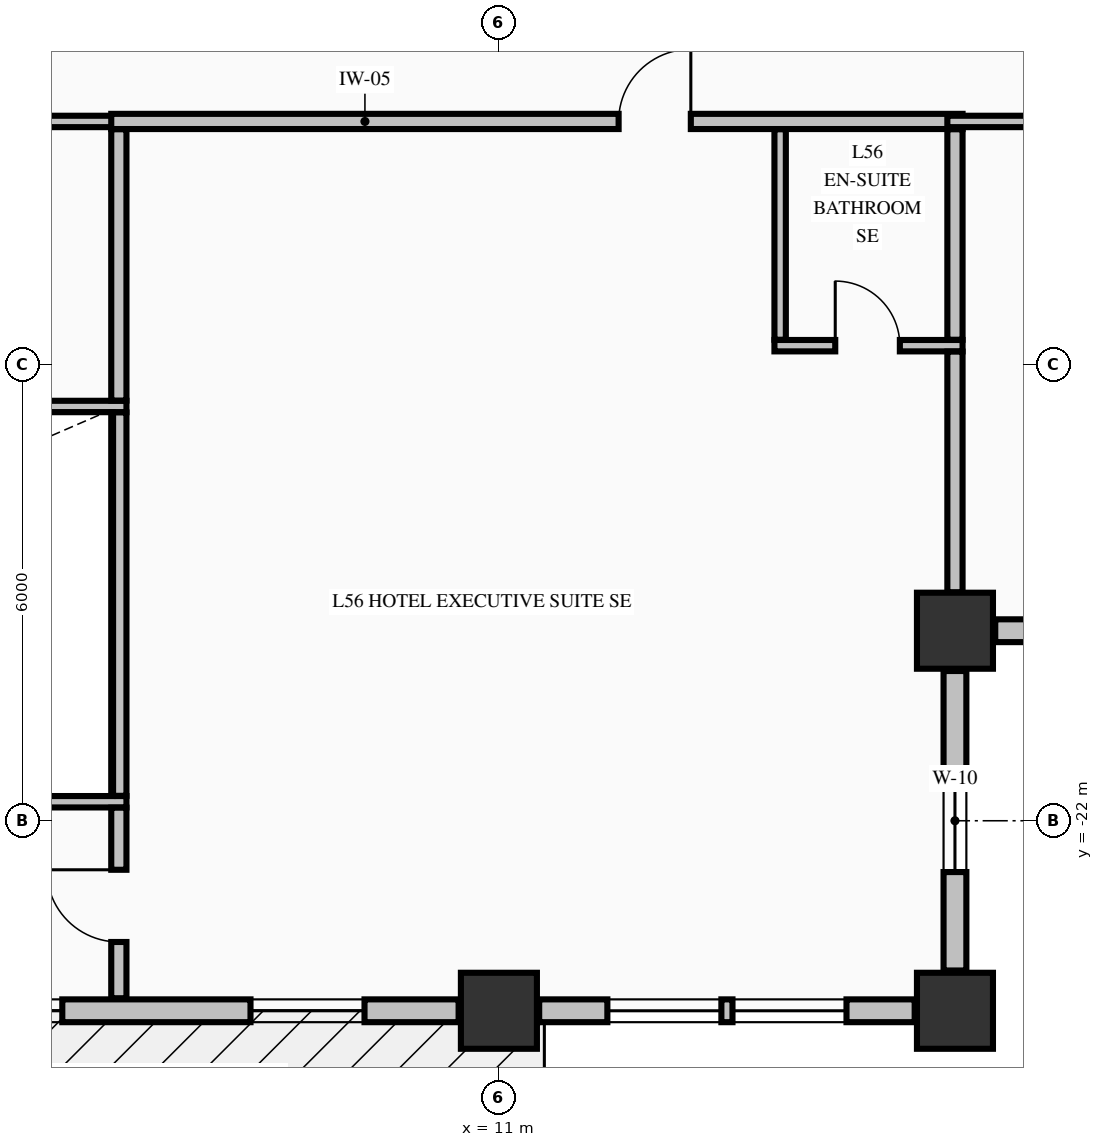
"""IFC4 building model, lengths in metres.
Left out: names, types, materials, properties, quantities, classifications, styles, units other than length and angle.
Written with IfcOpenShell. Run it as: python <this file> out.ifc"""

import sys

from ifc_helpers import new_model, si_unit, direction, frame, frame_2d, origin, origin_2d, place, context, subcontext, project, spatial, rectangle, extrude, element, fill, save


model = new_model("IFC4")
c1 = context("Model", 3, precision=1e-05, world=origin(), true_north=direction((0.0, 1.0)))
c2 = subcontext(c1, "Body", "Model", "MODEL_VIEW")
j1 = project(units=[si_unit("LENGTHUNIT", "METRE"), si_unit("PLANEANGLEUNIT", "RADIAN")], contexts=[c1])
p1 = place(None, origin())
s1 = spatial("IfcSite", under=j1, at=p1, CompositionType="ELEMENT")
p2 = place(p1, origin())
s2 = spatial("IfcBuilding", under=s1, at=p2, CompositionType="ELEMENT")
p3 = place(p2, frame((0.0, 0.0, 215.26)))
s3 = spatial("IfcBuildingStorey", under=s2, at=p3, CompositionType="ELEMENT", Elevation=215.26)
for number, where, z_axis, x_axis in (
    (1, (11.0, -24.5, -0.25), (0.0, 0.0, 1.0), (1.0, 0.0, 0.0)),
    (2, (17.0, -24.5, -0.25), (0.0, 0.0, 1.0), (1.0, 0.0, 0.0)),
    (3, (17.0, -19.5, -0.25), (0.0, 0.0, 1.0), (1.0, 0.0, 0.0)),
):
    element("IfcColumn", number, at=place(p3, frame(where, z_axis=z_axis, x_axis=x_axis)), inside=s3, PredefinedType="COLUMN", context=c2, shape_type="SweptSolid", body=[
        extrude(rectangle(XDim=1.0, YDim=1.0, at=origin_2d()), origin(), (0.0, 0.0, 1.0), 3.4),
    ])
p4 = place(p3, frame((17.0, -23.97, 0.0), z_axis=(0.0, 0.0, 1.0), x_axis=(0.0, 1.0, 0.0)))
e4 = element("IfcWall", 4, at=p4, inside=s3, PredefinedType="STANDARD", context=c2, shape_type="SweptSolid", body=[
    extrude(rectangle(XDim=3.94, YDim=0.3, at=frame_2d((1.97, 0.0))), origin(), (0.0, 0.0, 1.0), 2.542),
])
p5 = place(p4, frame((1.295, 0.0, 0.68)))
e5 = element("IfcOpeningElement", 5, at=p5, cuts=e4, PredefinedType="OPENING", context=c2, shape_type="SweptSolid", body=[
    extrude(rectangle(XDim=1.35, YDim=1.42, at=frame_2d((0.675, 0.71))), frame((0.0, 0.16, 0.0), z_axis=(0.0, -1.0, 0.0), x_axis=(1.0, 0.0, 0.0)), (0.0, 0.0, 1.0), 0.32),
])
p6 = place(p3, frame((17.53, -19.5, 0.0), z_axis=(0.0, 0.0, 1.0), x_axis=(1.0, 0.0, 0.0)))
e6 = element("IfcWall", 6, at=p6, inside=s3, PredefinedType="STANDARD", context=c2, shape_type="SweptSolid", body=[
    extrude(rectangle(XDim=3.94, YDim=0.3, at=frame_2d((1.97, 0.0))), origin(), (0.0, 0.0, 1.0), 2.542),
])
p7 = place(p6, frame((1.295, 0.0, 0.68)))
e7 = element("IfcOpeningElement", 7, at=p7, cuts=e6, PredefinedType="OPENING", context=c2, shape_type="SweptSolid", body=[
    extrude(rectangle(XDim=1.35, YDim=1.42, at=frame_2d((0.675, 0.71))), frame((0.0, 0.16, 0.0), z_axis=(0.0, -1.0, 0.0), x_axis=(1.0, 0.0, 0.0)), (0.0, 0.0, 1.0), 0.32),
])
p8 = place(p3, frame((0.53, -24.5, 0.0), z_axis=(0.0, 0.0, 1.0), x_axis=(1.0, 0.0, 0.0)))
e8 = element("IfcWall", 8, at=p8, inside=s3, PredefinedType="STANDARD", context=c2, shape_type="SweptSolid", body=[
    extrude(rectangle(XDim=9.94, YDim=0.3, at=frame_2d((4.97, 0.0))), origin(), (0.0, 0.0, 1.0), 2.542),
])
p9 = place(p8, frame((1.238, 0.0, 0.72)))
e9 = element("IfcOpeningElement", 9, at=p9, cuts=e8, PredefinedType="OPENING", context=c2, shape_type="SweptSolid", body=[
    extrude(rectangle(XDim=1.5, YDim=1.6, at=frame_2d((0.75, 0.8))), frame((0.0, 0.16, 0.0), z_axis=(0.0, -1.0, 0.0), x_axis=(1.0, 0.0, 0.0)), (0.0, 0.0, 1.0), 0.32),
])
p10 = place(p8, frame((3.226, 0.0, 0.72)))
e10 = element("IfcOpeningElement", 10, at=p10, cuts=e8, PredefinedType="OPENING", context=c2, shape_type="SweptSolid", body=[
    extrude(rectangle(XDim=1.5, YDim=1.6, at=frame_2d((0.75, 0.8))), frame((0.0, 0.16, 0.0), z_axis=(0.0, -1.0, 0.0), x_axis=(1.0, 0.0, 0.0)), (0.0, 0.0, 1.0), 0.32),
])
p11 = place(p8, frame((7.202, 0.0, 0.72)))
e11 = element("IfcOpeningElement", 11, at=p11, cuts=e8, PredefinedType="OPENING", context=c2, shape_type="SweptSolid", body=[
    extrude(rectangle(XDim=1.5, YDim=1.6, at=frame_2d((0.75, 0.8))), frame((0.0, 0.16, 0.0), z_axis=(0.0, -1.0, 0.0), x_axis=(1.0, 0.0, 0.0)), (0.0, 0.0, 1.0), 0.32),
])
p12 = place(p3, frame((11.53, -24.5, 0.0), z_axis=(0.0, 0.0, 1.0), x_axis=(1.0, 0.0, 0.0)))
e12 = element("IfcWall", 12, at=p12, inside=s3, PredefinedType="STANDARD", context=c2, shape_type="SweptSolid", body=[
    extrude(rectangle(XDim=4.94, YDim=0.3, at=frame_2d((2.47, 0.0))), origin(), (0.0, 0.0, 1.0), 2.542),
])
p13 = place(p12, frame((0.897, 0.0, 0.72)))
e13 = element("IfcOpeningElement", 13, at=p13, cuts=e12, PredefinedType="OPENING", context=c2, shape_type="SweptSolid", body=[
    extrude(rectangle(XDim=1.5, YDim=1.6, at=frame_2d((0.75, 0.8))), frame((0.0, 0.16, 0.0), z_axis=(0.0, -1.0, 0.0), x_axis=(1.0, 0.0, 0.0)), (0.0, 0.0, 1.0), 0.32),
])
p14 = place(p12, frame((2.543, 0.0, 0.72)))
e14 = element("IfcOpeningElement", 14, at=p14, cuts=e12, PredefinedType="OPENING", context=c2, shape_type="SweptSolid", body=[
    extrude(rectangle(XDim=1.5, YDim=1.6, at=frame_2d((0.75, 0.8))), frame((0.0, 0.16, 0.0), z_axis=(0.0, -1.0, 0.0), x_axis=(1.0, 0.0, 0.0)), (0.0, 0.0, 1.0), 0.32),
])
for number, where, z_axis, x_axis in (
    (15, (-6.1, -21.75, 0.0), (0.0, 0.0, 1.0), (1.0, 0.0, 0.0)),
    (16, (-6.1, -16.55, 0.0), (0.0, 0.0, 1.0), (1.0, 0.0, 0.0)),
):
    element("IfcWall", number, at=place(p3, frame(where, z_axis=z_axis, x_axis=x_axis)), inside=s3, PredefinedType="PARTITIONING", context=c2, shape_type="SweptSolid", body=[
        extrude(rectangle(XDim=12.2, YDim=0.15, at=frame_2d((6.1, 0.0))), origin(), (0.0, 0.0, 1.0), 3.15),
    ])
p15 = place(p3, frame((14.625, -15.75, 0.0), z_axis=(0.0, 0.0, 1.0), x_axis=(1.0, 0.0, 0.0)))
e17 = element("IfcWall", 17, at=p15, inside=s3, PredefinedType="PARTITIONING", context=c2, shape_type="SweptSolid", body=[
    extrude(rectangle(XDim=2.475, YDim=0.15, at=frame_2d((1.238, 0.0))), origin(), (0.0, 0.0, 1.0), 3.15),
])
p16 = place(p15, frame((0.8, 0.0, 0.0)))
e18 = element("IfcOpeningElement", 18, at=p16, cuts=e17, PredefinedType="OPENING", context=c2, shape_type="SweptSolid", body=[
    extrude(rectangle(XDim=0.85, YDim=2.1, at=frame_2d((0.425, 1.05))), frame((0.0, 0.085, 0.0), z_axis=(0.0, -1.0, 0.0), x_axis=(1.0, 0.0, 0.0)), (0.0, 0.0, 1.0), 0.17),
])
p17 = place(p3, frame((-6.1, -12.8, 0.0), z_axis=(0.0, 0.0, 1.0), x_axis=(1.0, 0.0, 0.0)))
e19 = element("IfcWall", 19, at=p17, inside=s3, PredefinedType="PARTITIONING", context=c2, shape_type="SweptSolid", body=[
    extrude(rectangle(XDim=12.2, YDim=0.15, at=frame_2d((6.1, 0.0))), origin(), (0.0, 0.0, 1.0), 3.15),
])
p18 = place(p17, frame((2.75, 0.0, 0.0)))
e20 = element("IfcOpeningElement", 20, at=p18, cuts=e19, PredefinedType="OPENING", context=c2, shape_type="SweptSolid", body=[
    extrude(rectangle(XDim=1.1, YDim=2.15, at=frame_2d((0.55, 1.075))), frame((0.0, 0.085, 0.0), z_axis=(0.0, -1.0, 0.0), x_axis=(1.0, 0.0, 0.0)), (0.0, 0.0, 1.0), 0.17),
])
p19 = place(p3, frame((5.9, -12.8, 0.0), z_axis=(0.0, 0.0, 1.0), x_axis=(1.0, 0.0, 0.0)))
e21 = element("IfcWall", 21, at=p19, inside=s3, PredefinedType="PARTITIONING", context=c2, shape_type="SweptSolid", body=[
    extrude(rectangle(XDim=11.2, YDim=0.2, at=frame_2d((5.6, 0.0))), origin(), (0.0, 0.0, 1.0), 3.15),
])
p20 = place(p19, frame((6.675, 0.0, 0.0)))
e22 = element("IfcOpeningElement", 22, at=p20, cuts=e21, PredefinedType="OPENING", context=c2, shape_type="SweptSolid", body=[
    extrude(rectangle(XDim=0.95, YDim=2.15, at=frame_2d((0.475, 1.075))), frame((0.0, 0.11, 0.0), z_axis=(0.0, -1.0, 0.0), x_axis=(1.0, 0.0, 0.0)), (0.0, 0.0, 1.0), 0.22),
])
p21 = place(p3, frame((16.9, -12.8, 0.0), z_axis=(0.0, 0.0, 1.0), x_axis=(1.0, 0.0, 0.0)))
e23 = element("IfcWall", 23, at=p21, inside=s3, PredefinedType="PARTITIONING", context=c2, shape_type="SweptSolid", body=[
    extrude(rectangle(XDim=3.175, YDim=0.15, at=frame_2d((1.587, 0.0))), origin(), (0.0, 0.0, 1.0), 3.15),
])
p22 = place(p3, frame((6.0, -24.335, 0.0), z_axis=(0.0, 0.0, 1.0), x_axis=(0.0, 1.0, 0.0)))
e24 = element("IfcWall", 24, at=p22, inside=s3, PredefinedType="PARTITIONING", context=c2, shape_type="SweptSolid", body=[
    extrude(rectangle(XDim=2.507, YDim=0.2, at=frame_2d((1.253, 0.0))), origin(), (0.0, 0.0, 1.0), 3.15),
])
p23 = place(p22, frame((0.74, 0.0, 0.0)))
e25 = element("IfcOpeningElement", 25, at=p23, cuts=e24, PredefinedType="OPENING", context=c2, shape_type="SweptSolid", body=[
    extrude(rectangle(XDim=0.95, YDim=2.15, at=frame_2d((0.475, 1.075))), frame((0.0, 0.11, 0.0), z_axis=(0.0, -1.0, 0.0), x_axis=(1.0, 0.0, 0.0)), (0.0, 0.0, 1.0), 0.22),
])
p24 = place(p3, frame((6.0, -21.672, 0.0), z_axis=(0.0, 0.0, 1.0), x_axis=(0.0, 1.0, 0.0)))
e26 = element("IfcWall", 26, at=p24, inside=s3, PredefinedType="PARTITIONING", context=c2, shape_type="SweptSolid", body=[
    extrude(rectangle(XDim=5.044, YDim=0.2, at=frame_2d((2.522, 0.0))), origin(), (0.0, 0.0, 1.0), 3.15),
])
p25 = place(p3, frame((6.0, -16.472, 0.0), z_axis=(0.0, 0.0, 1.0), x_axis=(0.0, 1.0, 0.0)))
e27 = element("IfcWall", 27, at=p25, inside=s3, PredefinedType="PARTITIONING", context=c2, shape_type="SweptSolid", body=[
    extrude(rectangle(XDim=3.569, YDim=0.2, at=frame_2d((1.784, 0.0))), origin(), (0.0, 0.0, 1.0), 3.15),
])
p26 = place(p3, frame((14.7, -15.672, 0.0), z_axis=(0.0, 0.0, 1.0), x_axis=(0.0, 1.0, 0.0)))
e28 = element("IfcWall", 28, at=p26, inside=s3, PredefinedType="PARTITIONING", context=c2, shape_type="SweptSolid", body=[
    extrude(rectangle(XDim=2.769, YDim=0.15, at=frame_2d((1.385, 0.0))), origin(), (0.0, 0.0, 1.0), 3.15),
])
p27 = place(p3, frame((17.0, -18.994, 0.0), z_axis=(0.0, 0.0, 1.0), x_axis=(0.0, 1.0, 0.0)))
e29 = element("IfcWall", 29, at=p27, inside=s3, PredefinedType="PARTITIONING", context=c2, shape_type="SweptSolid", body=[
    extrude(rectangle(XDim=3.166, YDim=0.2, at=frame_2d((1.583, 0.0))), origin(), (0.0, 0.0, 1.0), 3.15),
])
p28 = place(p3, frame((17.0, -15.672, 0.0), z_axis=(0.0, 0.0, 1.0), x_axis=(0.0, 1.0, 0.0)))
e30 = element("IfcWall", 30, at=p28, inside=s3, PredefinedType="PARTITIONING", context=c2, shape_type="SweptSolid", body=[
    extrude(rectangle(XDim=2.769, YDim=0.2, at=frame_2d((1.385, 0.0))), origin(), (0.0, 0.0, 1.0), 3.15),
])
p29 = place(p5, origin())
e31 = element("IfcWindow", 31, at=p29, inside=s3, PartitioningType="SINGLE_PANEL", PredefinedType="WINDOW", context=c2, shape_type="SweptSolid", body=[
    extrude(rectangle(XDim=1.35, YDim=1.42, at=frame_2d((0.675, 0.71))), frame((0.0, 0.03, 0.0), z_axis=(0.0, -1.0, 0.0), x_axis=(1.0, 0.0, 0.0)), (0.0, 0.0, 1.0), 0.06),
])
fill(e5, e31)
p30 = place(p10, origin())
e32 = element("IfcWindow", 32, at=p30, inside=s3, PartitioningType="SINGLE_PANEL", PredefinedType="WINDOW", context=c2, shape_type="SweptSolid", body=[
    extrude(rectangle(XDim=1.5, YDim=1.6, at=frame_2d((0.75, 0.8))), frame((0.0, 0.03, 0.0), z_axis=(0.0, -1.0, 0.0), x_axis=(1.0, 0.0, 0.0)), (0.0, 0.0, 1.0), 0.06),
])
fill(e10, e32)
p31 = place(p11, origin())
e33 = element("IfcWindow", 33, at=p31, inside=s3, PartitioningType="SINGLE_PANEL", PredefinedType="WINDOW", context=c2, shape_type="SweptSolid", body=[
    extrude(rectangle(XDim=1.5, YDim=1.6, at=frame_2d((0.75, 0.8))), frame((0.0, 0.03, 0.0), z_axis=(0.0, -1.0, 0.0), x_axis=(1.0, 0.0, 0.0)), (0.0, 0.0, 1.0), 0.06),
])
fill(e11, e33)
p32 = place(p13, origin())
e34 = element("IfcWindow", 34, at=p32, inside=s3, PartitioningType="SINGLE_PANEL", PredefinedType="WINDOW", context=c2, shape_type="SweptSolid", body=[
    extrude(rectangle(XDim=1.5, YDim=1.6, at=frame_2d((0.75, 0.8))), frame((0.0, 0.03, 0.0), z_axis=(0.0, -1.0, 0.0), x_axis=(1.0, 0.0, 0.0)), (0.0, 0.0, 1.0), 0.06),
])
fill(e13, e34)
p33 = place(p14, origin())
e35 = element("IfcWindow", 35, at=p33, inside=s3, PartitioningType="SINGLE_PANEL", PredefinedType="WINDOW", context=c2, shape_type="SweptSolid", body=[
    extrude(rectangle(XDim=1.5, YDim=1.6, at=frame_2d((0.75, 0.8))), frame((0.0, 0.03, 0.0), z_axis=(0.0, -1.0, 0.0), x_axis=(1.0, 0.0, 0.0)), (0.0, 0.0, 1.0), 0.06),
])
fill(e14, e35)
p34 = place(p23, origin())
e36 = element("IfcDoor", 36, at=p34, inside=s3, OperationType="SINGLE_SWING_RIGHT", PredefinedType="DOOR", context=c2, shape_type="SweptSolid", body=[
    extrude(rectangle(XDim=0.95, YDim=2.15, at=frame_2d((0.475, 1.075))), frame((0.0, 0.025, 0.0), z_axis=(0.0, -1.0, 0.0), x_axis=(1.0, 0.0, 0.0)), (0.0, 0.0, 1.0), 0.05),
])
fill(e25, e36)
p35 = place(p20, origin())
e37 = element("IfcDoor", 37, at=p35, inside=s3, OperationType="SINGLE_SWING_RIGHT", PredefinedType="DOOR", context=c2, shape_type="SweptSolid", body=[
    extrude(rectangle(XDim=0.95, YDim=2.15, at=frame_2d((0.475, 1.075))), frame((0.0, 0.025, 0.0), z_axis=(0.0, -1.0, 0.0), x_axis=(1.0, 0.0, 0.0)), (0.0, 0.0, 1.0), 0.05),
])
fill(e22, e37)
p36 = place(p16, origin())
e38 = element("IfcDoor", 38, at=p36, inside=s3, OperationType="SINGLE_SWING_LEFT", PredefinedType="DOOR", context=c2, shape_type="SweptSolid", body=[
    extrude(rectangle(XDim=0.85, YDim=2.1, at=frame_2d((0.425, 1.05))), frame((0.0, 0.025, 0.0), z_axis=(0.0, -1.0, 0.0), x_axis=(1.0, 0.0, 0.0)), (0.0, 0.0, 1.0), 0.05),
])
fill(e18, e38)
save(model, sys.argv[1])
